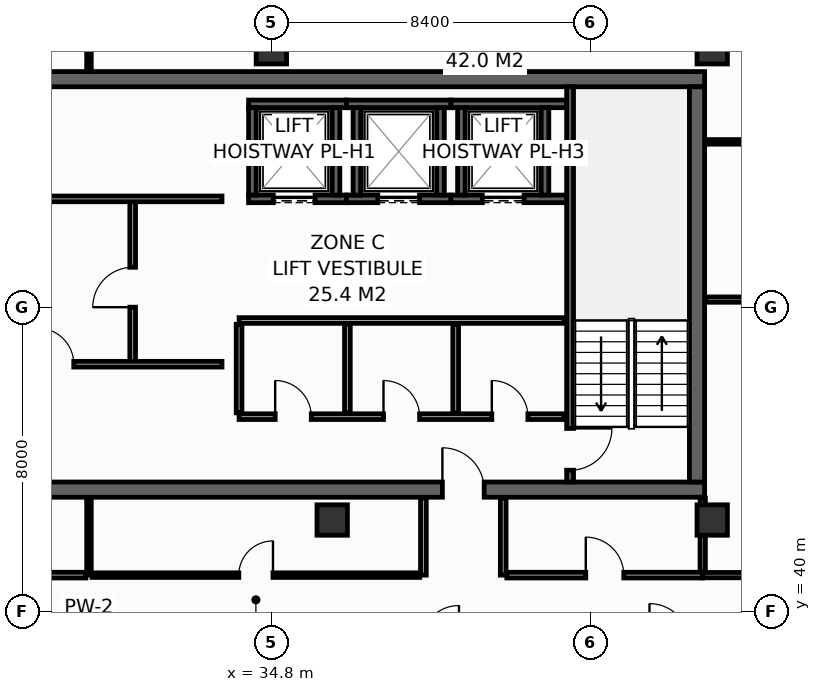
"""IFC4 building model, lengths in metres.
Left out: names, types, materials, properties, quantities, classifications, styles, units other than length and angle.
Written with IfcOpenShell. Run it as: python <this file> out.ifc"""

import sys

from ifc_helpers import new_model, si_unit, direction, frame, frame_2d, origin, origin_2d, place, context, subcontext, project, spatial, rectangle, hollow_rectangle, extrude, element, fill, save


model = new_model("IFC4")
c1 = context("Model", 3, precision=1e-05, world=origin(), true_north=direction((0.0, 1.0)))
c2 = subcontext(c1, "Body", "Model", "MODEL_VIEW")
j1 = project(units=[si_unit("LENGTHUNIT", "METRE"), si_unit("PLANEANGLEUNIT", "RADIAN")], contexts=[c1])
p1 = place(None, origin())
s1 = spatial("IfcSite", under=j1, at=p1, CompositionType="ELEMENT")
p2 = place(p1, origin())
s2 = spatial("IfcBuilding", under=s1, at=p2, CompositionType="ELEMENT")
p3 = place(p2, frame((0.0, 0.0, 234.4)))
s3 = spatial("IfcBuildingStorey", under=s2, at=p3, CompositionType="ELEMENT", Elevation=234.4)
p4 = place(p3, frame((13.7, 43.2, 0.0), z_axis=(0.0, 0.0, 1.0), x_axis=(1.0, 0.0, 0.0)))
e1 = element("IfcWall", 1, at=p4, inside=s3, PredefinedType="SHEAR", context=c2, shape_type="SweptSolid", body=[
    extrude(rectangle(XDim=32.5, YDim=0.4, at=frame_2d((16.25, 0.0))), origin(), (0.0, 0.0, 1.0), 3.55),
])
p5 = place(p4, frame((5.4, 0.0, 0.0)))
e2 = element("IfcOpeningElement", 2, at=p5, cuts=e1, PredefinedType="OPENING", context=c2, shape_type="SweptSolid", body=[
    extrude(rectangle(XDim=1.1, YDim=2.15, at=frame_2d((0.55, 1.075))), frame((0.0, 0.21, 0.0), z_axis=(0.0, -1.0, 0.0), x_axis=(1.0, 0.0, 0.0)), (0.0, 0.0, 1.0), 0.42),
])
p6 = place(p4, frame((25.6, 0.0, 0.0)))
e3 = element("IfcOpeningElement", 3, at=p6, cuts=e1, PredefinedType="OPENING", context=c2, shape_type="SweptSolid", body=[
    extrude(rectangle(XDim=1.1, YDim=2.15, at=frame_2d((0.55, 1.075))), frame((0.0, 0.21, 0.0), z_axis=(0.0, -1.0, 0.0), x_axis=(1.0, 0.0, 0.0)), (0.0, 0.0, 1.0), 0.42),
])
p7 = place(p3, frame((13.7, 54.0, 0.0), z_axis=(0.0, 0.0, 1.0), x_axis=(1.0, 0.0, 0.0)))
e4 = element("IfcWall", 4, at=p7, inside=s3, PredefinedType="SHEAR", context=c2, shape_type="SweptSolid", body=[
    extrude(rectangle(XDim=32.5, YDim=0.4, at=frame_2d((16.25, 0.0))), origin(), (0.0, 0.0, 1.0), 3.55),
])
p8 = place(p3, frame((46.0, 43.4, 0.0), z_axis=(0.0, 0.0, 1.0), x_axis=(0.0, 1.0, 0.0)))
e5 = element("IfcWall", 5, at=p8, inside=s3, PredefinedType="SHEAR", context=c2, shape_type="SweptSolid", body=[
    extrude(rectangle(XDim=10.4, YDim=0.4, at=frame_2d((5.2, 0.0))), origin(), (0.0, 0.0, 1.0), 3.55),
])
for number, where, z_axis, x_axis in (
    (6, (34.8, 54.8, 0.0), (0.0, 0.0, 1.0), (1.0, 0.0, 0.0)),
    (7, (46.4, 54.8, 0.0), (0.0, 0.0, 1.0), (1.0, 0.0, 0.0)),
    (8, (36.4, 42.4, 0.0), (0.0, 0.0, 1.0), (1.0, 0.0, 0.0)),
    (9, (46.4, 42.4, 0.0), (0.0, 0.0, 1.0), (1.0, 0.0, 0.0)),
):
    element("IfcColumn", number, at=place(p3, frame(where, z_axis=z_axis, x_axis=x_axis)), inside=s3, PredefinedType="COLUMN", context=c2, shape_type="SweptSolid", body=[
        extrude(hollow_rectangle(XDim=0.8, YDim=0.8, WallThickness=0.036, at=origin_2d()), origin(), (0.0, 0.0, 1.0), 3.8),
    ])
p9 = place(p3, frame((34.2, 50.85, 0.0), z_axis=(0.0, 0.0, 1.0), x_axis=(1.0, 0.0, 0.0)))
e10 = element("IfcWall", 10, at=p9, inside=s3, PredefinedType="SHEAR", context=c2, shape_type="SweptSolid", body=[
    extrude(rectangle(XDim=2.575, YDim=0.2, at=frame_2d((1.288, 0.0))), origin(), (0.0, 0.0, 1.0), 3.55),
])
p10 = place(p9, frame((0.65, 0.0, 0.0)))
e11 = element("IfcOpeningElement", 11, at=p10, cuts=e10, PredefinedType="OPENING", context=c2, shape_type="SweptSolid", body=[
    extrude(rectangle(XDim=1.1, YDim=2.2, at=frame_2d((0.55, 1.1))), frame((0.0, 0.11, 0.0), z_axis=(0.0, -1.0, 0.0), x_axis=(1.0, 0.0, 0.0)), (0.0, 0.0, 1.0), 0.22),
])
p11 = place(p3, frame((34.2, 53.35, 0.0), z_axis=(0.0, 0.0, 1.0), x_axis=(1.0, 0.0, 0.0)))
e12 = element("IfcWall", 12, at=p11, inside=s3, PredefinedType="SHEAR", context=c2, shape_type="SweptSolid", body=[
    extrude(rectangle(XDim=2.575, YDim=0.2, at=frame_2d((1.288, 0.0))), origin(), (0.0, 0.0, 1.0), 3.55),
])
for number, where, z_axis, x_axis in (
    (13, (34.3, 50.95, 0.0), (0.0, 0.0, 1.0), (0.0, 1.0, 0.0)),
    (14, (36.5, 50.95, 0.0), (0.0, 0.0, 1.0), (0.0, 1.0, 0.0)),
):
    element("IfcWall", number, at=place(p3, frame(where, z_axis=z_axis, x_axis=x_axis)), inside=s3, PredefinedType="SHEAR", context=c2, shape_type="SweptSolid", body=[
        extrude(rectangle(XDim=2.3, YDim=0.2, at=frame_2d((1.15, 0.0))), origin(), (0.0, 0.0, 1.0), 3.55),
    ])
p12 = place(p3, frame((36.775, 50.85, 0.0), z_axis=(0.0, 0.0, 1.0), x_axis=(1.0, 0.0, 0.0)))
e15 = element("IfcWall", 15, at=p12, inside=s3, PredefinedType="SHEAR", context=c2, shape_type="SweptSolid", body=[
    extrude(rectangle(XDim=2.75, YDim=0.2, at=frame_2d((1.375, 0.0))), origin(), (0.0, 0.0, 1.0), 3.55),
])
p13 = place(p12, frame((0.825, 0.0, 0.0)))
e16 = element("IfcOpeningElement", 16, at=p13, cuts=e15, PredefinedType="OPENING", context=c2, shape_type="SweptSolid", body=[
    extrude(rectangle(XDim=1.1, YDim=2.2, at=frame_2d((0.55, 1.1))), frame((0.0, 0.11, 0.0), z_axis=(0.0, -1.0, 0.0), x_axis=(1.0, 0.0, 0.0)), (0.0, 0.0, 1.0), 0.22),
])
p14 = place(p3, frame((36.775, 53.35, 0.0), z_axis=(0.0, 0.0, 1.0), x_axis=(1.0, 0.0, 0.0)))
e17 = element("IfcWall", 17, at=p14, inside=s3, PredefinedType="SHEAR", context=c2, shape_type="SweptSolid", body=[
    extrude(rectangle(XDim=2.75, YDim=0.2, at=frame_2d((1.375, 0.0))), origin(), (0.0, 0.0, 1.0), 3.55),
])
for number, where, z_axis, x_axis in (
    (18, (37.05, 50.95, 0.0), (0.0, 0.0, 1.0), (0.0, 1.0, 0.0)),
    (19, (39.25, 50.95, 0.0), (0.0, 0.0, 1.0), (0.0, 1.0, 0.0)),
):
    element("IfcWall", number, at=place(p3, frame(where, z_axis=z_axis, x_axis=x_axis)), inside=s3, PredefinedType="SHEAR", context=c2, shape_type="SweptSolid", body=[
        extrude(rectangle(XDim=2.3, YDim=0.2, at=frame_2d((1.15, 0.0))), origin(), (0.0, 0.0, 1.0), 3.55),
    ])
p15 = place(p3, frame((39.525, 50.85, 0.0), z_axis=(0.0, 0.0, 1.0), x_axis=(1.0, 0.0, 0.0)))
e20 = element("IfcWall", 20, at=p15, inside=s3, PredefinedType="SHEAR", context=c2, shape_type="SweptSolid", body=[
    extrude(rectangle(XDim=3.045, YDim=0.2, at=frame_2d((1.522, 0.0))), origin(), (0.0, 0.0, 1.0), 3.55),
])
p16 = place(p15, frame((0.825, 0.0, 0.0)))
e21 = element("IfcOpeningElement", 21, at=p16, cuts=e20, PredefinedType="OPENING", context=c2, shape_type="SweptSolid", body=[
    extrude(rectangle(XDim=1.1, YDim=2.2, at=frame_2d((0.55, 1.1))), frame((0.0, 0.11, 0.0), z_axis=(0.0, -1.0, 0.0), x_axis=(1.0, 0.0, 0.0)), (0.0, 0.0, 1.0), 0.22),
])
p17 = place(p3, frame((39.525, 53.35, 0.0), z_axis=(0.0, 0.0, 1.0), x_axis=(1.0, 0.0, 0.0)))
e22 = element("IfcWall", 22, at=p17, inside=s3, PredefinedType="SHEAR", context=c2, shape_type="SweptSolid", body=[
    extrude(rectangle(XDim=3.045, YDim=0.2, at=frame_2d((1.522, 0.0))), origin(), (0.0, 0.0, 1.0), 3.55),
])
for number, where, z_axis, x_axis in (
    (23, (39.8, 50.95, 0.0), (0.0, 0.0, 1.0), (0.0, 1.0, 0.0)),
    (24, (42.0, 50.95, 0.0), (0.0, 0.0, 1.0), (0.0, 1.0, 0.0)),
):
    element("IfcWall", number, at=place(p3, frame(where, z_axis=z_axis, x_axis=x_axis)), inside=s3, PredefinedType="SHEAR", context=c2, shape_type="SweptSolid", body=[
        extrude(rectangle(XDim=2.3, YDim=0.2, at=frame_2d((1.15, 0.0))), origin(), (0.0, 0.0, 1.0), 3.55),
    ])
p18 = place(p3, frame((42.66, 53.8, 0.0), z_axis=(0.0, 0.0, 1.0), x_axis=(0.0, -1.0, 0.0)))
e25 = element("IfcWall", 25, at=p18, inside=s3, PredefinedType="SHEAR", context=c2, shape_type="SweptSolid", body=[
    extrude(rectangle(XDim=10.4, YDim=0.18, at=frame_2d((5.2, 0.0))), origin(), (0.0, 0.0, 1.0), 3.55),
])
p19 = place(p18, frame((8.99, 0.0, 0.0)))
e26 = element("IfcOpeningElement", 26, at=p19, cuts=e25, PredefinedType="OPENING", context=c2, shape_type="SweptSolid", body=[
    extrude(rectangle(XDim=1.1, YDim=2.15, at=frame_2d((0.55, 1.075))), frame((0.0, 0.1, 0.0), z_axis=(0.0, -1.0, 0.0), x_axis=(1.0, 0.0, 0.0)), (0.0, 0.0, 1.0), 0.2),
])
p20 = place(p3, frame((31.15, 46.5, 0.0), z_axis=(0.0, 0.0, 1.0), x_axis=(0.0, 1.0, 0.0)))
e27 = element("IfcWall", 27, at=p20, inside=s3, PredefinedType="PARTITIONING", context=c2, shape_type="SweptSolid", body=[
    extrude(rectangle(XDim=4.35, YDim=0.15, at=frame_2d((2.175, 0.0))), origin(), (0.0, 0.0, 1.0), 3.55),
])
p21 = place(p20, frame((1.5, 0.0, 0.0)))
e28 = element("IfcOpeningElement", 28, at=p21, cuts=e27, PredefinedType="OPENING", context=c2, shape_type="SweptSolid", body=[
    extrude(rectangle(XDim=1.05, YDim=2.15, at=frame_2d((0.525, 1.075))), frame((0.0, 0.085, 0.0), z_axis=(0.0, -1.0, 0.0), x_axis=(1.0, 0.0, 0.0)), (0.0, 0.0, 1.0), 0.17),
])
p22 = place(p3, frame((33.95, 45.12, 0.0), z_axis=(0.0, 0.0, 1.0), x_axis=(1.0, 0.0, 0.0)))
e29 = element("IfcWall", 29, at=p22, inside=s3, PredefinedType="PARTITIONING", context=c2, shape_type="SweptSolid", body=[
    extrude(rectangle(XDim=8.55, YDim=0.15, at=frame_2d((4.275, 0.0))), origin(), (0.0, 0.0, 1.0), 3.55),
])
p23 = place(p22, frame((0.95, 0.0, 0.0)))
e30 = element("IfcOpeningElement", 30, at=p23, cuts=e29, PredefinedType="OPENING", context=c2, shape_type="SweptSolid", body=[
    extrude(rectangle(XDim=0.95, YDim=2.15, at=frame_2d((0.475, 1.075))), frame((0.0, 0.085, 0.0), z_axis=(0.0, -1.0, 0.0), x_axis=(1.0, 0.0, 0.0)), (0.0, 0.0, 1.0), 0.17),
])
p24 = place(p22, frame((3.8, 0.0, 0.0)))
e31 = element("IfcOpeningElement", 31, at=p24, cuts=e29, PredefinedType="OPENING", context=c2, shape_type="SweptSolid", body=[
    extrude(rectangle(XDim=0.95, YDim=2.15, at=frame_2d((0.475, 1.075))), frame((0.0, 0.085, 0.0), z_axis=(0.0, -1.0, 0.0), x_axis=(1.0, 0.0, 0.0)), (0.0, 0.0, 1.0), 0.17),
])
p25 = place(p22, frame((6.65, 0.0, 0.0)))
e32 = element("IfcOpeningElement", 32, at=p25, cuts=e29, PredefinedType="OPENING", context=c2, shape_type="SweptSolid", body=[
    extrude(rectangle(XDim=0.95, YDim=2.15, at=frame_2d((0.475, 1.075))), frame((0.0, 0.085, 0.0), z_axis=(0.0, -1.0, 0.0), x_axis=(1.0, 0.0, 0.0)), (0.0, 0.0, 1.0), 0.17),
])
p26 = place(p3, frame((33.95, 47.65, 0.0), z_axis=(0.0, 0.0, 1.0), x_axis=(1.0, 0.0, 0.0)))
e33 = element("IfcWall", 33, at=p26, inside=s3, PredefinedType="PARTITIONING", context=c2, shape_type="SweptSolid", body=[
    extrude(rectangle(XDim=8.55, YDim=0.15, at=frame_2d((4.275, 0.0))), origin(), (0.0, 0.0, 1.0), 3.55),
])
for number, where, z_axis, x_axis in (
    (34, (33.95, 45.22, 0.0), (0.0, 0.0, 1.0), (0.0, 1.0, 0.0)),
    (35, (36.8, 45.22, 0.0), (0.0, 0.0, 1.0), (0.0, 1.0, 0.0)),
    (36, (39.65, 45.22, 0.0), (0.0, 0.0, 1.0), (0.0, 1.0, 0.0)),
):
    element("IfcWall", number, at=place(p3, frame(where, z_axis=z_axis, x_axis=x_axis)), inside=s3, PredefinedType="PARTITIONING", context=c2, shape_type="SweptSolid", body=[
        extrude(rectangle(XDim=2.33, YDim=0.15, at=frame_2d((1.165, 0.0))), origin(), (0.0, 0.0, 1.0), 3.55),
    ])
p27 = place(p3, frame((25.85, 50.85, 0.0), z_axis=(0.0, 0.0, 1.0), x_axis=(1.0, 0.0, 0.0)))
e37 = element("IfcWall", 37, at=p27, inside=s3, PredefinedType="PARTITIONING", context=c2, shape_type="SweptSolid", body=[
    extrude(rectangle(XDim=7.65, YDim=0.15, at=frame_2d((3.825, 0.0))), origin(), (0.0, 0.0, 1.0), 3.55),
])
p28 = place(p27, frame((1.25, 0.0, 0.0)))
e38 = element("IfcOpeningElement", 38, at=p28, cuts=e37, PredefinedType="OPENING", context=c2, shape_type="SweptSolid", body=[
    extrude(rectangle(XDim=0.95, YDim=2.15, at=frame_2d((0.475, 1.075))), frame((0.0, 0.085, 0.0), z_axis=(0.0, -1.0, 0.0), x_axis=(1.0, 0.0, 0.0)), (0.0, 0.0, 1.0), 0.17),
])
p29 = place(p3, frame((25.85, 46.5, 0.0), z_axis=(0.0, 0.0, 1.0), x_axis=(1.0, 0.0, 0.0)))
e39 = element("IfcWall", 39, at=p29, inside=s3, PredefinedType="PARTITIONING", context=c2, shape_type="SweptSolid", body=[
    extrude(rectangle(XDim=7.65, YDim=0.15, at=frame_2d((3.825, 0.0))), origin(), (0.0, 0.0, 1.0), 3.55),
])
p30 = place(p29, frame((2.8, 0.0, 0.0)))
e40 = element("IfcOpeningElement", 40, at=p30, cuts=e39, PredefinedType="OPENING", context=c2, shape_type="SweptSolid", body=[
    extrude(rectangle(XDim=0.95, YDim=2.15, at=frame_2d((0.475, 1.075))), frame((0.0, 0.085, 0.0), z_axis=(0.0, -1.0, 0.0), x_axis=(1.0, 0.0, 0.0)), (0.0, 0.0, 1.0), 0.17),
])
p31 = place(p3, frame((46.15, 40.95, 0.0), z_axis=(0.0, 0.0, 1.0), x_axis=(1.0, 0.0, 0.0)))
e41 = element("IfcWall", 41, at=p31, inside=s3, PredefinedType="PARTITIONING", context=c2, shape_type="SweptSolid", body=[
    extrude(rectangle(XDim=4.05, YDim=0.14, at=frame_2d((2.025, 0.0))), origin(), (0.0, 0.0, 1.0), 3.55),
])
p32 = place(p3, frame((46.15, 41.04, 0.0), z_axis=(0.0, 0.0, 1.0), x_axis=(0.0, 1.0, 0.0)))
e42 = element("IfcWall", 42, at=p32, inside=s3, PredefinedType="PARTITIONING", context=c2, shape_type="SweptSolid", body=[
    extrude(rectangle(XDim=1.94, YDim=0.14, at=frame_2d((0.97, 0.0))), origin(), (0.0, 0.0, 1.0), 3.55),
])
p33 = place(p3, frame((46.22, 48.2, 0.0), z_axis=(0.0, 0.0, 1.0), x_axis=(1.0, 0.0, 0.0)))
e43 = element("IfcWall", 43, at=p33, inside=s3, PredefinedType="PARTITIONING", context=c2, shape_type="SweptSolid", body=[
    extrude(rectangle(XDim=3.98, YDim=0.14, at=frame_2d((1.99, 0.0))), origin(), (0.0, 0.0, 1.0), 3.55),
])
p34 = place(p3, frame((46.22, 52.35, 0.0), z_axis=(0.0, 0.0, 1.0), x_axis=(1.0, 0.0, 0.0)))
e44 = element("IfcWall", 44, at=p34, inside=s3, PredefinedType="PARTITIONING", context=c2, shape_type="SweptSolid", body=[
    extrude(rectangle(XDim=3.98, YDim=0.12, at=frame_2d((1.99, 0.0))), origin(), (0.0, 0.0, 1.0), 3.55),
])
p35 = place(p3, frame((30.0, 54.22, 0.0), z_axis=(0.0, 0.0, 1.0), x_axis=(0.0, 1.0, 0.0)))
e45 = element("IfcWall", 45, at=p35, inside=s3, PredefinedType="PARTITIONING", context=c2, shape_type="SweptSolid", body=[
    extrude(rectangle(XDim=1.775, YDim=0.12, at=frame_2d((0.888, 0.0))), origin(), (0.0, 0.0, 1.0), 2.935),
])
for number, where, z_axis, x_axis in (
    (46, (38.8, 40.95, 0.0), (0.0, 0.0, 1.0), (0.0, 1.0, 0.0)),
    (47, (40.9, 40.95, 0.0), (0.0, 0.0, 1.0), (0.0, 1.0, 0.0)),
):
    element("IfcWall", number, at=place(p3, frame(where, z_axis=z_axis, x_axis=x_axis)), inside=s3, PredefinedType="PARTITIONING", context=c2, shape_type="SweptSolid", body=[
        extrude(rectangle(XDim=2.03, YDim=0.15, at=frame_2d((1.015, 0.0))), origin(), (0.0, 0.0, 1.0), 3.55),
    ])
p36 = place(p3, frame((30.0, 40.95, 0.0), z_axis=(0.0, 0.0, 1.0), x_axis=(0.0, 1.0, 0.0)))
e48 = element("IfcWall", 48, at=p36, inside=s3, PredefinedType="PARTITIONING", context=c2, shape_type="SweptSolid", body=[
    extrude(rectangle(XDim=2.03, YDim=0.12, at=frame_2d((1.015, 0.0))), origin(), (0.0, 0.0, 1.0), 2.947),
])
p37 = place(p3, frame((20.795, 40.95, 0.0), z_axis=(0.0, 0.0, 1.0), x_axis=(1.0, 0.0, 0.0)))
e49 = element("IfcWall", 49, at=p37, inside=s3, PredefinedType="PARTITIONING", context=c2, shape_type="SweptSolid", body=[
    extrude(rectangle(XDim=9.125, YDim=0.15, at=frame_2d((4.562, 0.0))), origin(), (0.0, 0.0, 1.0), 2.947),
])
p38 = place(p37, frame((4.062, 0.0, 0.0)))
e50 = element("IfcOpeningElement", 50, at=p38, cuts=e49, PredefinedType="OPENING", context=c2, shape_type="SweptSolid", body=[
    extrude(rectangle(XDim=1.0, YDim=2.15, at=frame_2d((0.5, 1.075))), frame((0.0, 0.085, 0.0), z_axis=(0.0, -1.0, 0.0), x_axis=(1.0, 0.0, 0.0)), (0.0, 0.0, 1.0), 0.17),
])
p39 = place(p3, frame((30.08, 40.95, 0.0), z_axis=(0.0, 0.0, 1.0), x_axis=(1.0, 0.0, 0.0)))
e51 = element("IfcWall", 51, at=p39, inside=s3, PredefinedType="PARTITIONING", context=c2, shape_type="SweptSolid", body=[
    extrude(rectangle(XDim=8.625, YDim=0.12, at=frame_2d((4.312, 0.0))), origin(), (0.0, 0.0, 1.0), 2.947),
])
p40 = place(p39, frame((3.862, 0.0, 0.0)))
e52 = element("IfcOpeningElement", 52, at=p40, cuts=e51, PredefinedType="OPENING", context=c2, shape_type="SweptSolid", body=[
    extrude(rectangle(XDim=0.9, YDim=2.1, at=frame_2d((0.45, 1.05))), frame((0.0, 0.07, 0.0), z_axis=(0.0, -1.0, 0.0), x_axis=(1.0, 0.0, 0.0)), (0.0, 0.0, 1.0), 0.14),
])
p41 = place(p3, frame((40.995, 40.95, 0.0), z_axis=(0.0, 0.0, 1.0), x_axis=(1.0, 0.0, 0.0)))
e53 = element("IfcWall", 53, at=p41, inside=s3, PredefinedType="PARTITIONING", context=c2, shape_type="SweptSolid", body=[
    extrude(rectangle(XDim=5.155, YDim=0.15, at=frame_2d((2.577, 0.0))), origin(), (0.0, 0.0, 1.0), 3.55),
])
p42 = place(p41, frame((2.078, 0.0, 0.0)))
e54 = element("IfcOpeningElement", 54, at=p42, cuts=e53, PredefinedType="OPENING", context=c2, shape_type="SweptSolid", body=[
    extrude(rectangle(XDim=1.0, YDim=2.15, at=frame_2d((0.5, 1.075))), frame((0.0, 0.085, 0.0), z_axis=(0.0, -1.0, 0.0), x_axis=(1.0, 0.0, 0.0)), (0.0, 0.0, 1.0), 0.17),
])
p43 = place(p10, origin())
e55 = element("IfcDoor", 55, at=p43, inside=s3, OperationType="SLIDING_TO_LEFT", PredefinedType="DOOR", context=c2, shape_type="SweptSolid", body=[
    extrude(rectangle(XDim=1.1, YDim=2.2, at=frame_2d((0.55, 1.1))), frame((0.0, 0.025, 0.0), z_axis=(0.0, -1.0, 0.0), x_axis=(1.0, 0.0, 0.0)), (0.0, 0.0, 1.0), 0.05),
])
fill(e11, e55)
p44 = place(p13, origin())
e56 = element("IfcDoor", 56, at=p44, inside=s3, OperationType="SLIDING_TO_LEFT", PredefinedType="DOOR", context=c2, shape_type="SweptSolid", body=[
    extrude(rectangle(XDim=1.1, YDim=2.2, at=frame_2d((0.55, 1.1))), frame((0.0, 0.025, 0.0), z_axis=(0.0, -1.0, 0.0), x_axis=(1.0, 0.0, 0.0)), (0.0, 0.0, 1.0), 0.05),
])
fill(e16, e56)
p45 = place(p16, origin())
e57 = element("IfcDoor", 57, at=p45, inside=s3, OperationType="SLIDING_TO_LEFT", PredefinedType="DOOR", context=c2, shape_type="SweptSolid", body=[
    extrude(rectangle(XDim=1.1, YDim=2.2, at=frame_2d((0.55, 1.1))), frame((0.0, 0.025, 0.0), z_axis=(0.0, -1.0, 0.0), x_axis=(1.0, 0.0, 0.0)), (0.0, 0.0, 1.0), 0.05),
])
fill(e21, e57)
p46 = place(p19, origin())
e58 = element("IfcDoor", 58, at=p46, inside=s3, OperationType="SINGLE_SWING_LEFT", PredefinedType="DOOR", context=c2, shape_type="SweptSolid", body=[
    extrude(rectangle(XDim=1.1, YDim=2.15, at=frame_2d((0.55, 1.075))), frame((0.0, 0.025, 0.0), z_axis=(0.0, -1.0, 0.0), x_axis=(1.0, 0.0, 0.0)), (0.0, 0.0, 1.0), 0.05),
])
fill(e26, e58)
p47 = place(p6, origin())
e59 = element("IfcDoor", 59, at=p47, inside=s3, OperationType="SINGLE_SWING_LEFT", PredefinedType="DOOR", context=c2, shape_type="SweptSolid", body=[
    extrude(rectangle(XDim=1.1, YDim=2.15, at=frame_2d((0.55, 1.075))), frame((0.0, 0.025, 0.0), z_axis=(0.0, -1.0, 0.0), x_axis=(1.0, 0.0, 0.0)), (0.0, 0.0, 1.0), 0.05),
])
fill(e3, e59)
p48 = place(p21, origin())
e60 = element("IfcDoor", 60, at=p48, inside=s3, OperationType="SINGLE_SWING_LEFT", PredefinedType="DOOR", context=c2, shape_type="SweptSolid", body=[
    extrude(rectangle(XDim=1.05, YDim=2.15, at=frame_2d((0.525, 1.075))), frame((0.0, 0.025, 0.0), z_axis=(0.0, -1.0, 0.0), x_axis=(1.0, 0.0, 0.0)), (0.0, 0.0, 1.0), 0.05),
])
fill(e28, e60)
p49 = place(p23, origin())
e61 = element("IfcDoor", 61, at=p49, inside=s3, OperationType="SINGLE_SWING_LEFT", PredefinedType="DOOR", context=c2, shape_type="SweptSolid", body=[
    extrude(rectangle(XDim=0.95, YDim=2.15, at=frame_2d((0.475, 1.075))), frame((0.0, 0.025, 0.0), z_axis=(0.0, -1.0, 0.0), x_axis=(1.0, 0.0, 0.0)), (0.0, 0.0, 1.0), 0.05),
])
fill(e30, e61)
p50 = place(p24, origin())
e62 = element("IfcDoor", 62, at=p50, inside=s3, OperationType="SINGLE_SWING_LEFT", PredefinedType="DOOR", context=c2, shape_type="SweptSolid", body=[
    extrude(rectangle(XDim=0.95, YDim=2.15, at=frame_2d((0.475, 1.075))), frame((0.0, 0.025, 0.0), z_axis=(0.0, -1.0, 0.0), x_axis=(1.0, 0.0, 0.0)), (0.0, 0.0, 1.0), 0.05),
])
fill(e31, e62)
p51 = place(p25, origin())
e63 = element("IfcDoor", 63, at=p51, inside=s3, OperationType="SINGLE_SWING_LEFT", PredefinedType="DOOR", context=c2, shape_type="SweptSolid", body=[
    extrude(rectangle(XDim=0.95, YDim=2.15, at=frame_2d((0.475, 1.075))), frame((0.0, 0.025, 0.0), z_axis=(0.0, -1.0, 0.0), x_axis=(1.0, 0.0, 0.0)), (0.0, 0.0, 1.0), 0.05),
])
fill(e32, e63)
p52 = place(p30, origin())
e64 = element("IfcDoor", 64, at=p52, inside=s3, OperationType="SINGLE_SWING_LEFT", PredefinedType="DOOR", context=c2, shape_type="SweptSolid", body=[
    extrude(rectangle(XDim=0.95, YDim=2.15, at=frame_2d((0.475, 1.075))), frame((0.0, 0.025, 0.0), z_axis=(0.0, -1.0, 0.0), x_axis=(1.0, 0.0, 0.0)), (0.0, 0.0, 1.0), 0.05),
])
fill(e40, e64)
p53 = place(p40, origin())
e65 = element("IfcDoor", 65, at=p53, inside=s3, OperationType="SINGLE_SWING_RIGHT", PredefinedType="DOOR", context=c2, shape_type="SweptSolid", body=[
    extrude(rectangle(XDim=0.9, YDim=2.1, at=frame_2d((0.45, 1.05))), frame((0.0, 0.025, 0.0), z_axis=(0.0, -1.0, 0.0), x_axis=(1.0, 0.0, 0.0)), (0.0, 0.0, 1.0), 0.05),
])
fill(e52, e65)
p54 = place(p42, origin())
e66 = element("IfcDoor", 66, at=p54, inside=s3, OperationType="SINGLE_SWING_LEFT", PredefinedType="DOOR", context=c2, shape_type="SweptSolid", body=[
    extrude(rectangle(XDim=1.0, YDim=2.15, at=frame_2d((0.5, 1.075))), frame((0.0, 0.025, 0.0), z_axis=(0.0, -1.0, 0.0), x_axis=(1.0, 0.0, 0.0)), (0.0, 0.0, 1.0), 0.05),
])
fill(e54, e66)
save(model, sys.argv[1])
